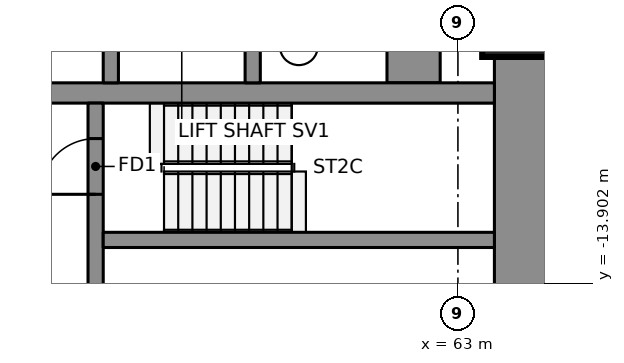
"""IFC4 building model, lengths in metres.
Left out: names, types, materials, properties, quantities, classifications, styles, units other than length and angle.
Written with IfcOpenShell. Run it as: python <this file> out.ifc"""

import sys

from ifc_helpers import new_model, si_unit, direction, frame, frame_2d, origin, origin_2d, place, context, subcontext, project, spatial, rectangle, extrude, element, fill, save


model = new_model("IFC4")
c1 = context("Model", 3, precision=1e-05, world=origin(), true_north=direction((0.0, 1.0)))
c2 = subcontext(c1, "Body", "Model", "MODEL_VIEW")
j1 = project(units=[si_unit("LENGTHUNIT", "METRE"), si_unit("PLANEANGLEUNIT", "RADIAN")], contexts=[c1])
p1 = place(None, origin())
s1 = spatial("IfcSite", under=j1, at=p1, CompositionType="ELEMENT")
p2 = place(p1, origin())
s2 = spatial("IfcBuilding", under=s1, at=p2, CompositionType="ELEMENT")
p3 = place(p2, frame((0.0, 0.0, 84.9)))
s3 = spatial("IfcBuildingStorey", under=s2, at=p3, CompositionType="ELEMENT", Elevation=84.9)
p4 = place(p3, frame((64.245, -15.75, 0.0), z_axis=(0.0, 0.0, 1.0), x_axis=(0.0, 1.0, 0.0)))
e1 = element("IfcWall", 1, at=p4, inside=s3, PredefinedType="SHEAR", context=c2, shape_type="SweptSolid", body=[
    extrude(rectangle(XDim=6.361, YDim=1.05, at=frame_2d((3.181, 0.0))), origin(), (0.0, 0.0, 1.0), 3.55),
])
p5 = place(p3, frame((62.125, -9.95, 0.0), z_axis=(0.0, 0.0, 1.0), x_axis=(0.0, 1.0, 0.0)))
e2 = element("IfcWall", 2, at=p5, inside=s3, PredefinedType="SHEAR", context=c2, shape_type="SweptSolid", body=[
    extrude(rectangle(XDim=19.9, YDim=1.05, at=frame_2d((9.95, 0.0))), origin(), (0.0, 0.0, 1.0), 3.55),
])
p6 = place(p3, frame((50.7, -10.15, 0.0), z_axis=(0.0, 0.0, 1.0), x_axis=(1.0, 0.0, 0.0)))
e3 = element("IfcWall", 3, at=p6, inside=s3, PredefinedType="SHEAR", context=c2, shape_type="SweptSolid", body=[
    extrude(rectangle(XDim=13.02, YDim=0.4, at=frame_2d((6.51, 0.0))), origin(), (0.0, 0.0, 1.0), 3.55),
])
for number, where, z_axis, x_axis in (
    (4, (56.15, -9.95, 0.0), (0.0, 0.0, 1.0), (0.0, 1.0, 0.0)),
    (5, (58.95, -9.95, 0.0), (0.0, 0.0, 1.0), (0.0, 1.0, 0.0)),
):
    element("IfcWall", number, at=place(p3, frame(where, z_axis=z_axis, x_axis=x_axis)), inside=s3, PredefinedType="SHEAR", context=c2, shape_type="SweptSolid", body=[
        extrude(rectangle(XDim=3.0, YDim=0.3, at=frame_2d((1.5, 0.0))), origin(), (0.0, 0.0, 1.0), 3.55),
    ])
p7 = place(p3, frame((55.85, -15.75, 0.0), z_axis=(0.0, 0.0, 1.0), x_axis=(0.0, 1.0, 0.0)))
e6 = element("IfcWall", 6, at=p7, inside=s3, PredefinedType="SHEAR", context=c2, shape_type="SweptSolid", body=[
    extrude(rectangle(XDim=5.4, YDim=0.3, at=frame_2d((2.7, 0.0))), origin(), (0.0, 0.0, 1.0), 3.55),
])
p8 = place(p7, frame((3.6, 0.0, 0.0)))
e7 = element("IfcOpeningElement", 7, at=p8, cuts=e6, PredefinedType="OPENING", context=c2, shape_type="SweptSolid", body=[
    extrude(rectangle(XDim=1.1, YDim=2.1, at=frame_2d((0.55, 1.05))), frame((0.0, 0.16, 0.0), z_axis=(0.0, -1.0, 0.0), x_axis=(1.0, 0.0, 0.0)), (0.0, 0.0, 1.0), 0.32),
])
p9 = place(p7, frame((0.8, 0.0, 0.0)))
e8 = element("IfcOpeningElement", 8, at=p9, cuts=e6, PredefinedType="OPENING", context=c2, shape_type="SweptSolid", body=[
    extrude(rectangle(XDim=0.9, YDim=2.1, at=frame_2d((0.45, 1.05))), frame((0.0, 0.16, 0.0), z_axis=(0.0, -1.0, 0.0), x_axis=(1.0, 0.0, 0.0)), (0.0, 0.0, 1.0), 0.32),
])
p10 = place(p3, frame((56.0, -13.05, 0.0), z_axis=(0.0, 0.0, 1.0), x_axis=(1.0, 0.0, 0.0)))
e9 = element("IfcWall", 9, at=p10, inside=s3, PredefinedType="SHEAR", context=c2, shape_type="SweptSolid", body=[
    extrude(rectangle(XDim=7.72, YDim=0.3, at=frame_2d((3.86, 0.0))), origin(), (0.0, 0.0, 1.0), 3.55),
])
p11 = place(p3, frame((64.329, -8.589, 0.0), z_axis=(0.0, 0.0, 1.0), x_axis=(1.0, 0.0, 0.0)))
e10 = element("IfcColumn", 10, at=p11, inside=s3, PredefinedType="COLUMN", context=c2, shape_type="SweptSolid", body=[
    extrude(rectangle(XDim=1.7, YDim=1.7, at=origin_2d()), origin(), (0.0, 0.0, 1.0), 3.55),
])
p12 = place(p8, origin())
e11 = element("IfcDoor", 11, at=p12, inside=s3, OperationType="SINGLE_SWING_RIGHT", PredefinedType="DOOR", context=c2, shape_type="SweptSolid", body=[
    extrude(rectangle(XDim=1.1, YDim=2.1, at=frame_2d((0.55, 1.05))), frame((0.0, 0.025, 0.0), z_axis=(0.0, -1.0, 0.0), x_axis=(1.0, 0.0, 0.0)), (0.0, 0.0, 1.0), 0.05),
])
fill(e7, e11)
save(model, sys.argv[1])
